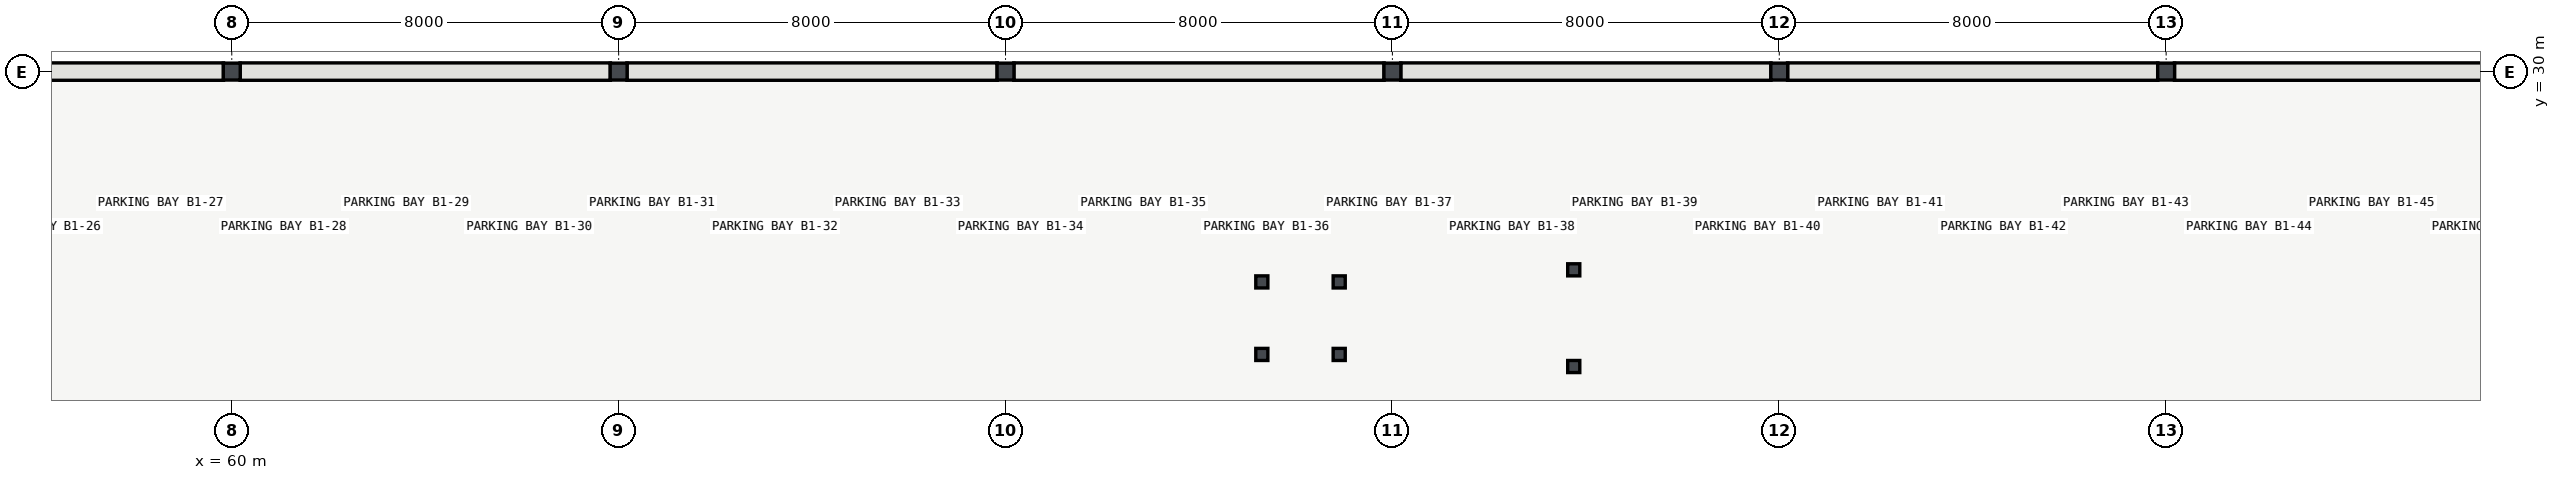
"""IFC4 building model, lengths in metres.
Left out: names, types, materials, properties, quantities, classifications, styles, units other than length and angle.
Written with IfcOpenShell. Run it as: python <this file> out.ifc"""

import sys

from ifc_helpers import new_model, si_unit, direction, frame, frame_2d, origin, origin_2d, place, context, subcontext, project, spatial, rectangle, i_section, extrude, element, save


model = new_model("IFC4")
c1 = context("Model", 3, precision=1e-05, world=origin(), true_north=direction((0.0, 1.0)))
c2 = subcontext(c1, "Body", "Model", "MODEL_VIEW")
j1 = project(units=[si_unit("LENGTHUNIT", "METRE"), si_unit("PLANEANGLEUNIT", "RADIAN")], contexts=[c1])
p1 = place(None, origin())
s1 = spatial("IfcSite", under=j1, at=p1, CompositionType="ELEMENT")
p2 = place(p1, origin())
s2 = spatial("IfcBuilding", under=s1, at=p2, CompositionType="ELEMENT")
p3 = place(p2, frame((0.0, 0.0, -4.8)))
s3 = spatial("IfcBuildingStorey", under=s2, at=p3, CompositionType="ELEMENT", Elevation=-4.8)
for number, where, z_axis, x_axis in (
    (1, (60.0, 30.0, 0.0), (0.0, 0.0, 1.0), (1.0, 0.0, 0.0)),
    (2, (68.0, 30.0, 0.0), (0.0, 0.0, 1.0), (1.0, 0.0, 0.0)),
    (3, (76.0, 30.0, 0.0), (0.0, 0.0, 1.0), (1.0, 0.0, 0.0)),
    (4, (84.0, 30.0, 0.0), (0.0, 0.0, 1.0), (1.0, 0.0, 0.0)),
    (5, (92.0, 30.0, 0.0), (0.0, 0.0, 1.0), (1.0, 0.0, 0.0)),
    (6, (100.0, 30.0, 0.0), (0.0, 0.0, 1.0), (1.0, 0.0, 0.0)),
):
    element("IfcColumn", number, at=place(p3, frame(where, z_axis=z_axis, x_axis=x_axis)), inside=s3, PredefinedType="COLUMN", context=c2, shape_type="SweptSolid", body=[
        extrude(i_section(OverallWidth=0.35, OverallDepth=0.35, WebThickness=0.012, FlangeThickness=0.019, FilletRadius=0.02, at=origin_2d()), origin(), (0.0, 0.0, 1.0), 4.8),
    ])
for number, where, z_axis, x_axis in (
    (7, (59.829, 30.0, 0.0), (0.0, 0.0, 1.0), (-1.0, 0.0, 0.0)),
    (8, (67.829, 30.0, 0.0), (0.0, 0.0, 1.0), (-1.0, 0.0, 0.0)),
    (9, (75.829, 30.0, 0.0), (0.0, 0.0, 1.0), (-1.0, 0.0, 0.0)),
    (10, (83.829, 30.0, 0.0), (0.0, 0.0, 1.0), (-1.0, 0.0, 0.0)),
    (11, (91.829, 30.0, 0.0), (0.0, 0.0, 1.0), (-1.0, 0.0, 0.0)),
    (12, (99.829, 30.0, 0.0), (0.0, 0.0, 1.0), (-1.0, 0.0, 0.0)),
    (13, (107.829, 30.0, 0.0), (0.0, 0.0, 1.0), (-1.0, 0.0, 0.0)),
):
    element("IfcWall", number, at=place(p3, frame(where, z_axis=z_axis, x_axis=x_axis)), inside=s3, PredefinedType="USERDEFINED", context=c2, shape_type="SweptSolid", body=[
        extrude(rectangle(XDim=7.658, YDim=0.36, at=frame_2d((3.829, 0.0))), origin(), (0.0, 0.0, 1.0), 4.043),
    ])
for number, where, z_axis, x_axis in (
    (14, (81.3, 24.15, 0.0), (0.0, 0.0, 1.0), (1.0, 0.0, 0.0)),
    (15, (82.9, 24.15, 0.0), (0.0, 0.0, 1.0), (1.0, 0.0, 0.0)),
    (16, (81.3, 25.65, 0.0), (0.0, 0.0, 1.0), (1.0, 0.0, 0.0)),
    (17, (82.9, 25.65, 0.0), (0.0, 0.0, 1.0), (1.0, 0.0, 0.0)),
    (18, (87.75, 23.9, 0.0), (0.0, 0.0, 1.0), (1.0, 0.0, 0.0)),
    (19, (87.75, 25.9, 0.0), (0.0, 0.0, 1.0), (1.0, 0.0, 0.0)),
):
    element("IfcColumn", number, at=place(p3, frame(where, z_axis=z_axis, x_axis=x_axis)), inside=s3, PredefinedType="COLUMN", context=c2, shape_type="SweptSolid", body=[
        extrude(i_section(OverallWidth=0.25, OverallDepth=0.25, WebThickness=0.009, FlangeThickness=0.014, FilletRadius=0.016, at=origin_2d()), origin(), (0.0, 0.0, 1.0), 4.8),
    ])
save(model, sys.argv[1])
